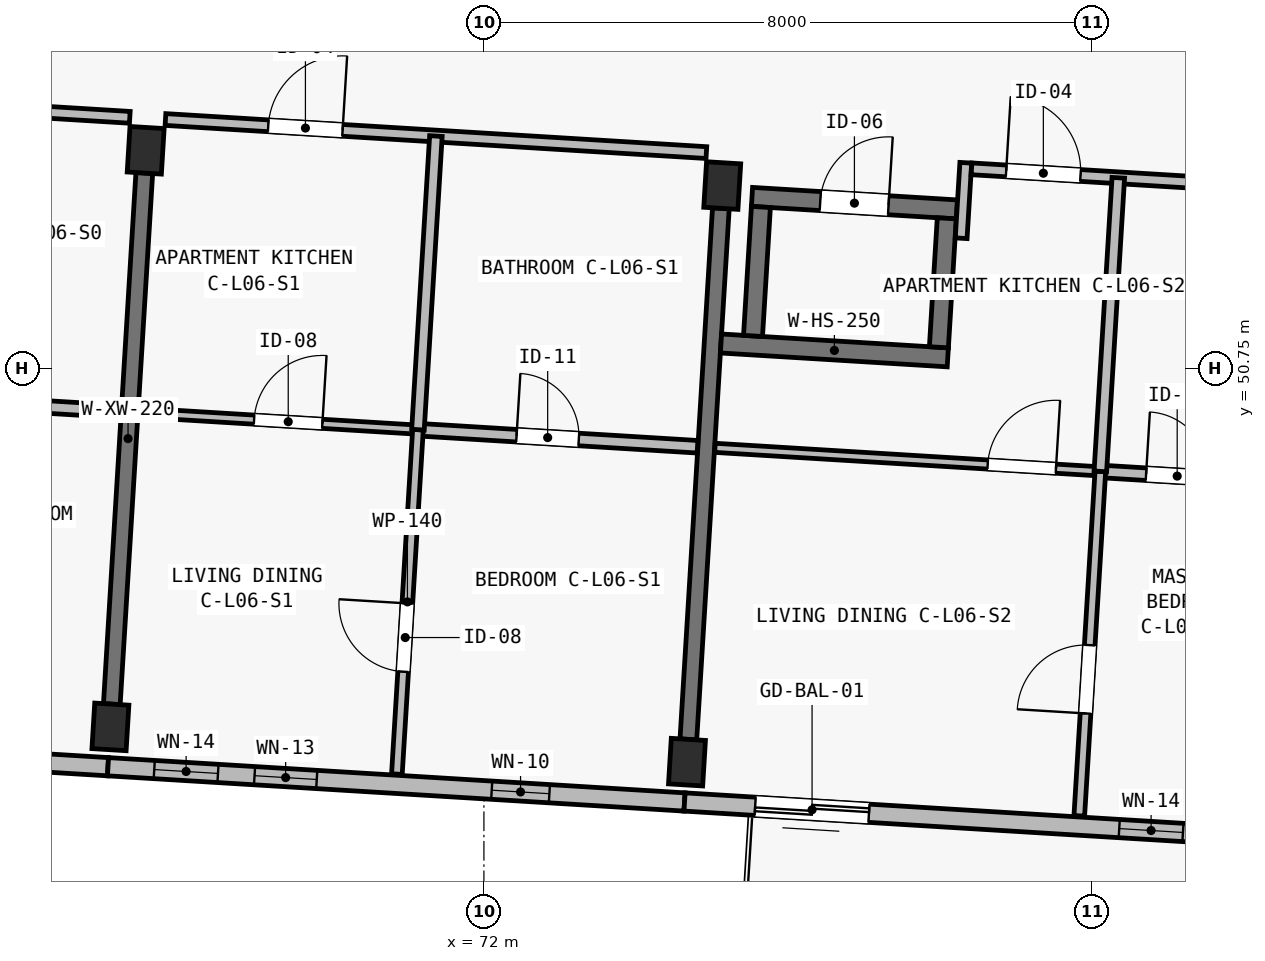
"""IFC4 building model, lengths in metres.
Left out: names, types, materials, properties, quantities, classifications, styles, units other than length and angle.
Written with IfcOpenShell. Run it as: python <this file> out.ifc"""

import sys

from ifc_helpers import new_model, si_unit, direction, frame, frame_2d, origin, origin_2d, place, context, subcontext, project, spatial, rectangle, extrude, element, fill, save


model = new_model("IFC4")
c1 = context("Model", 3, precision=1e-05, world=origin(), true_north=direction((0.0, 1.0)))
c2 = subcontext(c1, "Body", "Model", "MODEL_VIEW")
j1 = project(units=[si_unit("LENGTHUNIT", "METRE"), si_unit("PLANEANGLEUNIT", "RADIAN")], contexts=[c1])
p1 = place(None, origin())
s1 = spatial("IfcSite", under=j1, at=p1, CompositionType="ELEMENT")
p2 = place(p1, origin())
s2 = spatial("IfcBuilding", under=s1, at=p2, CompositionType="ELEMENT")
p3 = place(p2, frame((0.0, 0.0, 21.4)))
s3 = spatial("IfcBuildingStorey", under=s2, at=p3, CompositionType="ELEMENT", Elevation=21.4)
for number, where, z_axis, x_axis in (
    (1, (67.086, 46.036, 0.0), (0.0, 0.0, 1.0), (0.998, -0.061, 0.0)),
    (2, (67.55, 53.622, 0.0), (0.0, 0.0, 1.0), (0.998, -0.061, 0.0)),
    (3, (74.672, 45.572, 0.0), (0.0, 0.0, 1.0), (0.998, -0.061, 0.0)),
    (4, (75.135, 53.158, 0.0), (0.0, 0.0, 1.0), (0.998, -0.061, 0.0)),
):
    element("IfcColumn", number, at=place(p3, frame(where, z_axis=z_axis, x_axis=x_axis)), inside=s3, PredefinedType="COLUMN", context=c2, shape_type="SweptSolid", body=[
        extrude(rectangle(XDim=0.45, YDim=0.6, at=origin_2d()), origin(), (0.0, 0.0, 1.0), 3.25),
    ])
p4 = place(p3, frame((67.104, 46.335, 0.0), z_axis=(0.0, 0.0, 1.0), x_axis=(0.061034188237, 0.998135676081, 0.0)))
e5 = element("IfcWall", 5, at=p4, inside=s3, PredefinedType="SHEAR", context=c2, shape_type="SweptSolid", body=[
    extrude(rectangle(XDim=7.0, YDim=0.22, at=frame_2d((3.5, 0.0))), origin(), (0.0, 0.0, 1.0), 2.5),
])
p5 = place(p3, frame((74.69, 45.872, 0.0), z_axis=(0.0, 0.0, 1.0), x_axis=(0.061036313012, 0.998135546153, 0.0)))
e6 = element("IfcWall", 6, at=p5, inside=s3, PredefinedType="SHEAR", context=c2, shape_type="SweptSolid", body=[
    extrude(rectangle(XDim=7.0, YDim=0.22, at=frame_2d((3.5, 0.0))), origin(), (0.0, 0.0, 1.0), 2.5),
])
p6 = place(p3, frame((75.119, 51.08, 0.0), z_axis=(0.0, 0.0, 1.0), x_axis=(0.998133370443, -0.061071882298, 0.0)))
e7 = element("IfcWall", 7, at=p6, inside=s3, PredefinedType="SHEAR", context=c2, shape_type="SweptSolid", body=[
    extrude(rectangle(XDim=2.99, YDim=0.25, at=frame_2d((1.495, 0.0))), origin(), (0.0, 0.0, 1.0), 3.25),
])
p7 = place(p3, frame((75.527, 53.009, 0.0), z_axis=(0.0, 0.0, 1.0), x_axis=(0.998129907752, -0.061128448781, 0.0)))
e8 = element("IfcWall", 8, at=p7, inside=s3, PredefinedType="SHEAR", context=c2, shape_type="SweptSolid", body=[
    extrude(rectangle(XDim=2.7, YDim=0.25, at=frame_2d((1.35, 0.0))), origin(), (0.0, 0.0, 1.0), 3.25),
])
p8 = place(p7, frame((0.9, 0.0, 0.0)))
e9 = element("IfcOpeningElement", 9, at=p8, cuts=e8, PredefinedType="OPENING", context=c2, shape_type="SweptSolid", body=[
    extrude(rectangle(XDim=0.9, YDim=2.05, at=frame_2d((0.45, 1.025))), frame((0.0, 0.14, 0.0), z_axis=(0.0, -1.0, 0.0), x_axis=(1.0, 0.0, 0.0)), (0.0, 0.0, 1.0), 0.28),
])
p9 = place(p3, frame((75.541, 51.179, 0.0), z_axis=(0.0, 0.0, 1.0), x_axis=(0.061037062968, 0.998135500293, 0.0)))
e10 = element("IfcWall", 10, at=p9, inside=s3, PredefinedType="SHEAR", context=c2, shape_type="SweptSolid", body=[
    extrude(rectangle(XDim=1.7, YDim=0.25, at=frame_2d((0.85, 0.0))), origin(), (0.0, 0.0, 1.0), 3.25),
])
p10 = place(p3, frame((77.986, 51.03, 0.0), z_axis=(0.0, 0.0, 1.0), x_axis=(0.061028314627, 0.998136035225, 0.0)))
e11 = element("IfcWall", 11, at=p10, inside=s3, PredefinedType="SHEAR", context=c2, shape_type="SweptSolid", body=[
    extrude(rectangle(XDim=1.7, YDim=0.25, at=frame_2d((0.85, 0.0))), origin(), (0.0, 0.0, 1.0), 3.25),
])
p11 = place(p3, frame((67.054, 45.512, 0.0), z_axis=(0.0, 0.0, 1.0), x_axis=(-0.998134248939, 0.061057522844, 0.0)))
e12 = element("IfcWall", 12, at=p11, inside=s3, PredefinedType="SOLIDWALL", context=c2, shape_type="SweptSolid", body=[
    extrude(rectangle(XDim=8.125, YDim=0.24, at=frame_2d((4.062, 0.0))), origin(), (0.0, 0.0, 1.0), 3.0),
])
p12 = place(p11, frame((5.019, 0.0, 0.0)))
e13 = element("IfcOpeningElement", 13, at=p12, cuts=e12, PredefinedType="OPENING", context=c2, shape_type="SweptSolid", body=[
    extrude(rectangle(XDim=1.8, YDim=2.12, at=frame_2d((0.9, 1.06))), frame((0.0, 0.135, 0.0), z_axis=(0.0, -1.0, 0.0), x_axis=(1.0, 0.0, 0.0)), (0.0, 0.0, 1.0), 0.27),
])
p13 = place(p11, frame((0.83, 0.0, 0.42)))
e14 = element("IfcOpeningElement", 14, at=p13, cuts=e12, PredefinedType="OPENING", context=c2, shape_type="SweptSolid", body=[
    extrude(rectangle(XDim=0.72, YDim=2.16, at=frame_2d((0.36, 1.08))), frame((0.0, 0.135, 0.0), z_axis=(0.0, -1.0, 0.0), x_axis=(1.0, 0.0, 0.0)), (0.0, 0.0, 1.0), 0.27),
])
p14 = place(p3, frame((74.64, 45.048, 0.0), z_axis=(0.0, 0.0, 1.0), x_axis=(-0.998135669243, 0.061034300063, 0.0)))
e15 = element("IfcWall", 15, at=p14, inside=s3, PredefinedType="SOLIDWALL", context=c2, shape_type="SweptSolid", body=[
    extrude(rectangle(XDim=7.6, YDim=0.24, at=frame_2d((3.8, 0.0))), origin(), (0.0, 0.0, 1.0), 3.0),
])
p15 = place(p14, frame((1.781, 0.0, 0.48)))
e16 = element("IfcOpeningElement", 16, at=p15, cuts=e15, PredefinedType="OPENING", context=c2, shape_type="SweptSolid", body=[
    extrude(rectangle(XDim=0.76, YDim=2.34, at=frame_2d((0.38, 1.17))), frame((0.0, 0.135, 0.0), z_axis=(0.0, -1.0, 0.0), x_axis=(1.0, 0.0, 0.0)), (0.0, 0.0, 1.0), 0.27),
])
p16 = place(p14, frame((4.848, 0.0, 0.48)))
e17 = element("IfcOpeningElement", 17, at=p16, cuts=e15, PredefinedType="OPENING", context=c2, shape_type="SweptSolid", body=[
    extrude(rectangle(XDim=0.82, YDim=2.18, at=frame_2d((0.41, 1.09))), frame((0.0, 0.135, 0.0), z_axis=(0.0, -1.0, 0.0), x_axis=(1.0, 0.0, 0.0)), (0.0, 0.0, 1.0), 0.27),
])
p17 = place(p14, frame((6.15, 0.0, 0.52)))
e18 = element("IfcOpeningElement", 18, at=p17, cuts=e15, PredefinedType="OPENING", context=c2, shape_type="SweptSolid", body=[
    extrude(rectangle(XDim=0.84, YDim=2.28, at=frame_2d((0.42, 1.14))), frame((0.0, 0.135, 0.0), z_axis=(0.0, -1.0, 0.0), x_axis=(1.0, 0.0, 0.0)), (0.0, 0.0, 1.0), 0.27),
])
p18 = place(p3, frame((82.225, 44.584, 0.0), z_axis=(0.0, 0.0, 1.0), x_axis=(-0.998133591969, 0.061068261669, 0.0)))
e19 = element("IfcWall", 19, at=p18, inside=s3, PredefinedType="SOLIDWALL", context=c2, shape_type="SweptSolid", body=[
    extrude(rectangle(XDim=7.6, YDim=0.24, at=frame_2d((3.8, 0.0))), origin(), (0.0, 0.0, 1.0), 3.0),
])
p19 = place(p18, frame((5.169, 0.0, 0.0)))
e20 = element("IfcOpeningElement", 20, at=p19, cuts=e19, PredefinedType="OPENING", context=c2, shape_type="SweptSolid", body=[
    extrude(rectangle(XDim=1.5, YDim=2.12, at=frame_2d((0.75, 1.06))), frame((0.0, 0.135, 0.0), z_axis=(0.0, -1.0, 0.0), x_axis=(1.0, 0.0, 0.0)), (0.0, 0.0, 1.0), 0.27),
])
p20 = place(p18, frame((1.03, 0.0, 0.5)))
e21 = element("IfcOpeningElement", 21, at=p20, cuts=e19, PredefinedType="OPENING", context=c2, shape_type="SweptSolid", body=[
    extrude(rectangle(XDim=0.84, YDim=2.28, at=frame_2d((0.42, 1.14))), frame((0.0, 0.135, 0.0), z_axis=(0.0, -1.0, 0.0), x_axis=(1.0, 0.0, 0.0)), (0.0, 0.0, 1.0), 0.27),
])
p21 = place(p3, frame((60.06, 54.501, 0.0), z_axis=(0.0, 0.0, 1.0), x_axis=(0.998135030865, -0.061044739012, 0.0)))
e22 = element("IfcWall", 22, at=p21, inside=s3, PredefinedType="PARTITIONING", context=c2, shape_type="SweptSolid", body=[
    extrude(rectangle(XDim=7.295, YDim=0.155, at=frame_2d((3.647, 0.0))), origin(), (0.0, 0.0, 1.0), 2.97),
])
p22 = place(p21, frame((1.52, 0.0, 0.0)))
e23 = element("IfcOpeningElement", 23, at=p22, cuts=e22, PredefinedType="OPENING", context=c2, shape_type="SweptSolid", body=[
    extrude(rectangle(XDim=1.02, YDim=2.2, at=frame_2d((0.51, 1.1))), frame((0.0, 0.093, 0.0), z_axis=(0.0, -1.0, 0.0), x_axis=(1.0, 0.0, 0.0)), (0.0, 0.0, 1.0), 0.185),
])
p23 = place(p3, frame((63.546, 50.41, 0.0), z_axis=(0.0, 0.0, 1.0), x_axis=(0.998136719672, -0.061017119263, 0.0)))
e24 = element("IfcWall", 24, at=p23, inside=s3, PredefinedType="PLUMBINGWALL", context=c2, shape_type="SweptSolid", body=[
    extrude(rectangle(XDim=3.685, YDim=0.165, at=frame_2d((1.843, 0.0))), origin(), (0.0, 0.0, 1.0), 2.97),
])
p24 = place(p23, frame((1.3, 0.0, 0.0)))
e25 = element("IfcOpeningElement", 25, at=p24, cuts=e24, PredefinedType="OPENING", context=c2, shape_type="SweptSolid", body=[
    extrude(rectangle(XDim=0.82, YDim=2.08, at=frame_2d((0.41, 1.04))), frame((0.0, 0.097, 0.0), z_axis=(0.0, -1.0, 0.0), x_axis=(1.0, 0.0, 0.0)), (0.0, 0.0, 1.0), 0.195),
])
p25 = place(p3, frame((67.81, 54.027, 0.0), z_axis=(0.0, 0.0, 1.0), x_axis=(0.998136655722, -0.061018165369, 0.0)))
e26 = element("IfcWall", 26, at=p25, inside=s3, PredefinedType="PARTITIONING", context=c2, shape_type="SweptSolid", body=[
    extrude(rectangle(XDim=7.13, YDim=0.155, at=frame_2d((3.565, 0.0))), origin(), (0.0, 0.0, 1.0), 2.97),
])
p26 = place(p25, frame((1.355, 0.0, 0.0)))
e27 = element("IfcOpeningElement", 27, at=p26, cuts=e26, PredefinedType="OPENING", context=c2, shape_type="SweptSolid", body=[
    extrude(rectangle(XDim=0.98, YDim=2.15, at=frame_2d((0.49, 1.075))), frame((0.0, 0.093, 0.0), z_axis=(0.0, -1.0, 0.0), x_axis=(1.0, 0.0, 0.0)), (0.0, 0.0, 1.0), 0.185),
])
p27 = place(p3, frame((67.454, 50.171, 0.0), z_axis=(0.0, 0.0, 1.0), x_axis=(0.998132682596, -0.061083123148, 0.0)))
e28 = element("IfcWall", 28, at=p27, inside=s3, PredefinedType="PARTITIONING", context=c2, shape_type="SweptSolid", body=[
    extrude(rectangle(XDim=3.685, YDim=0.12, at=frame_2d((1.843, 0.0))), origin(), (0.0, 0.0, 1.0), 2.97),
])
p28 = place(p27, frame((1.525, 0.0, 0.0)))
e29 = element("IfcOpeningElement", 29, at=p28, cuts=e28, PredefinedType="OPENING", context=c2, shape_type="SweptSolid", body=[
    extrude(rectangle(XDim=0.9, YDim=2.1, at=frame_2d((0.45, 1.05))), frame((0.0, 0.075, 0.0), z_axis=(0.0, -1.0, 0.0), x_axis=(1.0, 0.0, 0.0)), (0.0, 0.0, 1.0), 0.15),
])
p29 = place(p3, frame((71.132, 49.946, 0.0), z_axis=(0.0, 0.0, 1.0), x_axis=(0.998136719672, -0.061017119263, 0.0)))
e30 = element("IfcWall", 30, at=p29, inside=s3, PredefinedType="PLUMBINGWALL", context=c2, shape_type="SweptSolid", body=[
    extrude(rectangle(XDim=3.685, YDim=0.165, at=frame_2d((1.843, 0.0))), origin(), (0.0, 0.0, 1.0), 2.97),
])
p30 = place(p29, frame((1.3, 0.0, 0.0)))
e31 = element("IfcOpeningElement", 31, at=p30, cuts=e30, PredefinedType="OPENING", context=c2, shape_type="SweptSolid", body=[
    extrude(rectangle(XDim=0.82, YDim=2.08, at=frame_2d((0.41, 1.04))), frame((0.0, 0.097, 0.0), z_axis=(0.0, -1.0, 0.0), x_axis=(1.0, 0.0, 0.0)), (0.0, 0.0, 1.0), 0.195),
])
p31 = place(p3, frame((70.855, 45.415, 0.0), z_axis=(0.0, 0.0, 1.0), x_axis=(0.061035713941, 0.998135582786, 0.0)))
e32 = element("IfcWall", 32, at=p31, inside=s3, PredefinedType="PARTITIONING", context=c2, shape_type="SweptSolid", body=[
    extrude(rectangle(XDim=4.54, YDim=0.14, at=frame_2d((2.27, 0.0))), origin(), (0.0, 0.0, 1.0), 2.97),
])
p32 = place(p31, frame((1.35, 0.0, 0.0)))
e33 = element("IfcOpeningElement", 33, at=p32, cuts=e32, PredefinedType="OPENING", context=c2, shape_type="SweptSolid", body=[
    extrude(rectangle(XDim=0.9, YDim=2.1, at=frame_2d((0.45, 1.05))), frame((0.0, 0.085, 0.0), z_axis=(0.0, -1.0, 0.0), x_axis=(1.0, 0.0, 0.0)), (0.0, 0.0, 1.0), 0.17),
])
p33 = place(p3, frame((71.132, 49.946, 0.0), z_axis=(0.0, 0.0, 1.0), x_axis=(0.061066453301, 0.998133702608, 0.0)))
e34 = element("IfcWall", 34, at=p33, inside=s3, PredefinedType="PLUMBINGWALL", context=c2, shape_type="SweptSolid", body=[
    extrude(rectangle(XDim=3.87, YDim=0.165, at=frame_2d((1.935, 0.0))), origin(), (0.0, 0.0, 1.0), 2.97),
])
p34 = place(p3, frame((78.279, 52.465, 0.0), z_axis=(0.0, 0.0, 1.0), x_axis=(0.061095097219, 0.998131949742, 0.0)))
e35 = element("IfcWall", 35, at=p34, inside=s3, PredefinedType="PARTITIONING", context=c2, shape_type="SweptSolid", body=[
    extrude(rectangle(XDim=0.995, YDim=0.155, at=frame_2d((0.498, 0.0))), origin(), (0.0, 0.0, 1.0), 2.97),
])
p35 = place(p3, frame((78.415, 53.378, 0.0), z_axis=(0.0, 0.0, 1.0), x_axis=(0.998132736029, -0.061082250024, 0.0)))
e36 = element("IfcWall", 36, at=p35, inside=s3, PredefinedType="PARTITIONING", context=c2, shape_type="SweptSolid", body=[
    extrude(rectangle(XDim=4.105, YDim=0.155, at=frame_2d((2.052, 0.0))), origin(), (0.0, 0.0, 1.0), 2.97),
])
p36 = place(p35, frame((0.457, 0.0, 0.0)))
e37 = element("IfcOpeningElement", 37, at=p36, cuts=e36, PredefinedType="OPENING", context=c2, shape_type="SweptSolid", body=[
    extrude(rectangle(XDim=0.98, YDim=2.15, at=frame_2d((0.49, 1.075))), frame((0.0, 0.093, 0.0), z_axis=(0.0, -1.0, 0.0), x_axis=(1.0, 0.0, 0.0)), (0.0, 0.0, 1.0), 0.185),
])
p37 = place(p3, frame((75.04, 49.707, 0.0), z_axis=(0.0, 0.0, 1.0), x_axis=(0.998135637207, -0.061034823981, 0.0)))
e38 = element("IfcWall", 38, at=p37, inside=s3, PredefinedType="PARTITIONING", context=c2, shape_type="SweptSolid", body=[
    extrude(rectangle(XDim=5.08, YDim=0.12, at=frame_2d((2.54, 0.0))), origin(), (0.0, 0.0, 1.0), 2.97),
])
p38 = place(p37, frame((3.595, 0.0, 0.0)))
e39 = element("IfcOpeningElement", 39, at=p38, cuts=e38, PredefinedType="OPENING", context=c2, shape_type="SweptSolid", body=[
    extrude(rectangle(XDim=0.9, YDim=2.1, at=frame_2d((0.45, 1.05))), frame((0.0, 0.075, 0.0), z_axis=(0.0, -1.0, 0.0), x_axis=(1.0, 0.0, 0.0)), (0.0, 0.0, 1.0), 0.15),
])
p39 = place(p3, frame((80.11, 49.397, 0.0), z_axis=(0.0, 0.0, 1.0), x_axis=(0.99813222782, -0.061090553999, 0.0)))
e40 = element("IfcWall", 40, at=p39, inside=s3, PredefinedType="PLUMBINGWALL", context=c2, shape_type="SweptSolid", body=[
    extrude(rectangle(XDim=2.29, YDim=0.165, at=frame_2d((1.145, 0.0))), origin(), (0.0, 0.0, 1.0), 2.97),
])
p40 = place(p39, frame((0.603, 0.0, 0.0)))
e41 = element("IfcOpeningElement", 41, at=p40, cuts=e40, PredefinedType="OPENING", context=c2, shape_type="SweptSolid", body=[
    extrude(rectangle(XDim=0.82, YDim=2.08, at=frame_2d((0.41, 1.04))), frame((0.0, 0.097, 0.0), z_axis=(0.0, -1.0, 0.0), x_axis=(1.0, 0.0, 0.0)), (0.0, 0.0, 1.0), 0.195),
])
p41 = place(p3, frame((79.833, 44.866, 0.0), z_axis=(0.0, 0.0, 1.0), x_axis=(0.061035713941, 0.998135582786, 0.0)))
e42 = element("IfcWall", 42, at=p41, inside=s3, PredefinedType="PARTITIONING", context=c2, shape_type="SweptSolid", body=[
    extrude(rectangle(XDim=4.54, YDim=0.14, at=frame_2d((2.27, 0.0))), origin(), (0.0, 0.0, 1.0), 2.97),
])
p42 = place(p41, frame((1.35, 0.0, 0.0)))
e43 = element("IfcOpeningElement", 43, at=p42, cuts=e42, PredefinedType="OPENING", context=c2, shape_type="SweptSolid", body=[
    extrude(rectangle(XDim=0.9, YDim=2.1, at=frame_2d((0.45, 1.05))), frame((0.0, 0.085, 0.0), z_axis=(0.0, -1.0, 0.0), x_axis=(1.0, 0.0, 0.0)), (0.0, 0.0, 1.0), 0.17),
])
p43 = place(p3, frame((80.11, 49.397, 0.0), z_axis=(0.0, 0.0, 1.0), x_axis=(0.061066453301, 0.998133702608, 0.0)))
e44 = element("IfcWall", 44, at=p43, inside=s3, PredefinedType="PLUMBINGWALL", context=c2, shape_type="SweptSolid", body=[
    extrude(rectangle(XDim=3.87, YDim=0.165, at=frame_2d((1.935, 0.0))), origin(), (0.0, 0.0, 1.0), 2.97),
])
p44 = place(p15, origin())
e45 = element("IfcWindow", 45, at=p44, inside=s3, PartitioningType="SINGLE_PANEL", PredefinedType="WINDOW", context=c2, shape_type="SweptSolid", body=[
    extrude(rectangle(XDim=0.76, YDim=2.34, at=frame_2d((0.38, 1.17))), frame((0.0, 0.03, 0.0), z_axis=(0.0, -1.0, 0.0), x_axis=(1.0, 0.0, 0.0)), (0.0, 0.0, 1.0), 0.06),
])
fill(e16, e45)
p45 = place(p16, origin())
e46 = element("IfcWindow", 46, at=p45, inside=s3, PartitioningType="SINGLE_PANEL", PredefinedType="WINDOW", context=c2, shape_type="SweptSolid", body=[
    extrude(rectangle(XDim=0.82, YDim=2.18, at=frame_2d((0.41, 1.09))), frame((0.0, 0.03, 0.0), z_axis=(0.0, -1.0, 0.0), x_axis=(1.0, 0.0, 0.0)), (0.0, 0.0, 1.0), 0.06),
])
fill(e17, e46)
p46 = place(p17, origin())
e47 = element("IfcWindow", 47, at=p46, inside=s3, PartitioningType="SINGLE_PANEL", PredefinedType="WINDOW", context=c2, shape_type="SweptSolid", body=[
    extrude(rectangle(XDim=0.84, YDim=2.28, at=frame_2d((0.42, 1.14))), frame((0.0, 0.03, 0.0), z_axis=(0.0, -1.0, 0.0), x_axis=(1.0, 0.0, 0.0)), (0.0, 0.0, 1.0), 0.06),
])
fill(e18, e47)
p47 = place(p19, origin())
e48 = element("IfcDoor", 48, at=p47, inside=s3, OperationType="SLIDING_TO_RIGHT", PredefinedType="DOOR", context=c2, shape_type="SweptSolid", body=[
    extrude(rectangle(XDim=1.5, YDim=2.12, at=frame_2d((0.75, 1.06))), frame((0.0, 0.025, 0.0), z_axis=(0.0, -1.0, 0.0), x_axis=(1.0, 0.0, 0.0)), (0.0, 0.0, 1.0), 0.05),
])
fill(e20, e48)
p48 = place(p20, origin())
e49 = element("IfcWindow", 49, at=p48, inside=s3, PartitioningType="SINGLE_PANEL", PredefinedType="WINDOW", context=c2, shape_type="SweptSolid", body=[
    extrude(rectangle(XDim=0.84, YDim=2.28, at=frame_2d((0.42, 1.14))), frame((0.0, 0.03, 0.0), z_axis=(0.0, -1.0, 0.0), x_axis=(1.0, 0.0, 0.0)), (0.0, 0.0, 1.0), 0.06),
])
fill(e21, e49)
p49 = place(p26, origin())
e50 = element("IfcDoor", 50, at=p49, inside=s3, OperationType="SINGLE_SWING_RIGHT", PredefinedType="DOOR", context=c2, shape_type="SweptSolid", body=[
    extrude(rectangle(XDim=0.98, YDim=2.15, at=frame_2d((0.49, 1.075))), frame((0.0, 0.025, 0.0), z_axis=(0.0, -1.0, 0.0), x_axis=(1.0, 0.0, 0.0)), (0.0, 0.0, 1.0), 0.05),
])
fill(e27, e50)
p50 = place(p28, origin())
e51 = element("IfcDoor", 51, at=p50, inside=s3, OperationType="SINGLE_SWING_RIGHT", PredefinedType="DOOR", context=c2, shape_type="SweptSolid", body=[
    extrude(rectangle(XDim=0.9, YDim=2.1, at=frame_2d((0.45, 1.05))), frame((0.0, 0.025, 0.0), z_axis=(0.0, -1.0, 0.0), x_axis=(1.0, 0.0, 0.0)), (0.0, 0.0, 1.0), 0.05),
])
fill(e29, e51)
p51 = place(p30, origin())
e52 = element("IfcDoor", 52, at=p51, inside=s3, OperationType="SINGLE_SWING_LEFT", PredefinedType="DOOR", context=c2, shape_type="SweptSolid", body=[
    extrude(rectangle(XDim=0.82, YDim=2.08, at=frame_2d((0.41, 1.04))), frame((0.0, 0.025, 0.0), z_axis=(0.0, -1.0, 0.0), x_axis=(1.0, 0.0, 0.0)), (0.0, 0.0, 1.0), 0.05),
])
fill(e31, e52)
p52 = place(p32, origin())
e53 = element("IfcDoor", 53, at=p52, inside=s3, OperationType="SINGLE_SWING_RIGHT", PredefinedType="DOOR", context=c2, shape_type="SweptSolid", body=[
    extrude(rectangle(XDim=0.9, YDim=2.1, at=frame_2d((0.45, 1.05))), frame((0.0, 0.025, 0.0), z_axis=(0.0, -1.0, 0.0), x_axis=(1.0, 0.0, 0.0)), (0.0, 0.0, 1.0), 0.05),
])
fill(e33, e53)
p53 = place(p36, origin())
e54 = element("IfcDoor", 54, at=p53, inside=s3, OperationType="SINGLE_SWING_LEFT", PredefinedType="DOOR", context=c2, shape_type="SweptSolid", body=[
    extrude(rectangle(XDim=0.98, YDim=2.15, at=frame_2d((0.49, 1.075))), frame((0.0, 0.025, 0.0), z_axis=(0.0, -1.0, 0.0), x_axis=(1.0, 0.0, 0.0)), (0.0, 0.0, 1.0), 0.05),
])
fill(e37, e54)
p54 = place(p38, origin())
e55 = element("IfcDoor", 55, at=p54, inside=s3, OperationType="SINGLE_SWING_RIGHT", PredefinedType="DOOR", context=c2, shape_type="SweptSolid", body=[
    extrude(rectangle(XDim=0.9, YDim=2.1, at=frame_2d((0.45, 1.05))), frame((0.0, 0.025, 0.0), z_axis=(0.0, -1.0, 0.0), x_axis=(1.0, 0.0, 0.0)), (0.0, 0.0, 1.0), 0.05),
])
fill(e39, e55)
p55 = place(p40, origin())
e56 = element("IfcDoor", 56, at=p55, inside=s3, OperationType="SINGLE_SWING_LEFT", PredefinedType="DOOR", context=c2, shape_type="SweptSolid", body=[
    extrude(rectangle(XDim=0.82, YDim=2.08, at=frame_2d((0.41, 1.04))), frame((0.0, 0.025, 0.0), z_axis=(0.0, -1.0, 0.0), x_axis=(1.0, 0.0, 0.0)), (0.0, 0.0, 1.0), 0.05),
])
fill(e41, e56)
p56 = place(p42, origin())
e57 = element("IfcDoor", 57, at=p56, inside=s3, OperationType="SINGLE_SWING_LEFT", PredefinedType="DOOR", context=c2, shape_type="SweptSolid", body=[
    extrude(rectangle(XDim=0.9, YDim=2.1, at=frame_2d((0.45, 1.05))), frame((0.0, 0.025, 0.0), z_axis=(0.0, -1.0, 0.0), x_axis=(1.0, 0.0, 0.0)), (0.0, 0.0, 1.0), 0.05),
])
fill(e43, e57)
p57 = place(p8, origin())
e58 = element("IfcDoor", 58, at=p57, inside=s3, OperationType="SINGLE_SWING_RIGHT", PredefinedType="DOOR", context=c2, shape_type="SweptSolid", body=[
    extrude(rectangle(XDim=0.9, YDim=2.05, at=frame_2d((0.45, 1.025))), frame((0.0, 0.025, 0.0), z_axis=(0.0, -1.0, 0.0), x_axis=(1.0, 0.0, 0.0)), (0.0, 0.0, 1.0), 0.05),
])
fill(e9, e58)
save(model, sys.argv[1])
